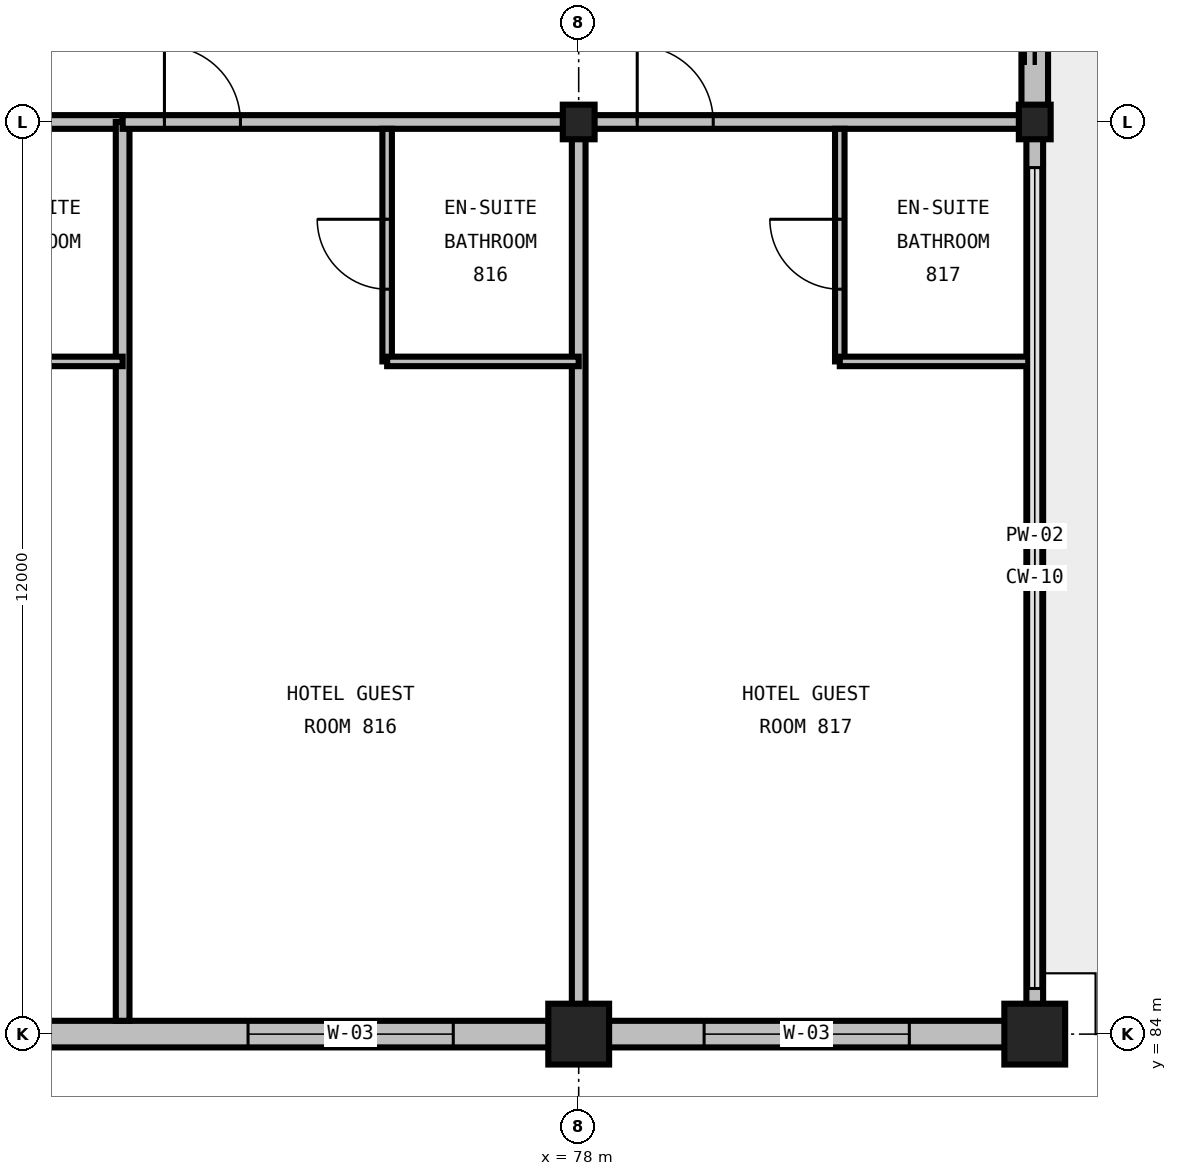
"""IFC4 building model, lengths in metres.
Left out: names, types, materials, properties, quantities, classifications, styles, units other than length and angle.
Written with IfcOpenShell. Run it as: python <this file> out.ifc"""

import sys

from ifc_helpers import new_model, si_unit, direction, frame, frame_2d, origin, origin_2d, place, context, subcontext, project, spatial, rectangle, i_section, extrude, element, fill, save


model = new_model("IFC4")
c1 = context("Model", 3, precision=1e-05, world=origin(), true_north=direction((0.0, 1.0)))
c2 = subcontext(c1, "Body", "Model", "MODEL_VIEW")
j1 = project(units=[si_unit("LENGTHUNIT", "METRE"), si_unit("PLANEANGLEUNIT", "RADIAN")], contexts=[c1])
p1 = place(None, origin())
s1 = spatial("IfcSite", under=j1, at=p1, CompositionType="ELEMENT")
p2 = place(p1, origin())
s2 = spatial("IfcBuilding", under=s1, at=p2, CompositionType="ELEMENT")
p3 = place(p2, frame((0.0, 0.0, 38.4)))
s3 = spatial("IfcBuildingStorey", under=s2, at=p3, CompositionType="ELEMENT", Elevation=38.4)
p4 = place(p3, frame((78.0, 84.0, 0.0), z_axis=(0.0, 0.0, 1.0), x_axis=(1.0, 0.0, 0.0)))
e1 = element("IfcColumn", 1, at=p4, inside=s3, PredefinedType="COLUMN", context=c2, shape_type="SweptSolid", body=[
    extrude(rectangle(XDim=0.8, YDim=0.8, at=origin_2d()), origin(), (0.0, 0.0, 1.0), 3.6),
])
p5 = place(p3, frame((78.0, 96.0, 0.0), z_axis=(0.0, 0.0, 1.0), x_axis=(1.0, 0.0, 0.0)))
e2 = element("IfcColumn", 2, at=p5, inside=s3, PredefinedType="COLUMN", context=c2, shape_type="SweptSolid", body=[
    extrude(i_section(OverallWidth=0.419, OverallDepth=0.455, WebThickness=0.042, FlangeThickness=0.068, FilletRadius=0.031, at=origin_2d()), origin(), (0.0, 0.0, 1.0), 3.6),
])
p6 = place(p3, frame((84.0, 84.0, 0.0), z_axis=(0.0, 0.0, 1.0), x_axis=(1.0, 0.0, 0.0)))
e3 = element("IfcColumn", 3, at=p6, inside=s3, PredefinedType="COLUMN", context=c2, shape_type="SweptSolid", body=[
    extrude(rectangle(XDim=0.8, YDim=0.8, at=origin_2d()), origin(), (0.0, 0.0, 1.0), 3.6),
])
p7 = place(p3, frame((84.0, 96.0, 0.0), z_axis=(0.0, 0.0, 1.0), x_axis=(1.0, 0.0, 0.0)))
e4 = element("IfcColumn", 4, at=p7, inside=s3, PredefinedType="COLUMN", context=c2, shape_type="SweptSolid", body=[
    extrude(i_section(OverallWidth=0.419, OverallDepth=0.455, WebThickness=0.042, FlangeThickness=0.068, FilletRadius=0.031, at=origin_2d()), origin(), (0.0, 0.0, 1.0), 3.6),
])
p8 = place(p3, frame((66.0, 84.0, 0.0), z_axis=(0.0, 0.0, 1.0), x_axis=(1.0, 0.0, 0.0)))
e5 = element("IfcWall", 5, at=p8, inside=s3, PredefinedType="STANDARD", context=c2, shape_type="SweptSolid", body=[
    extrude(rectangle(XDim=12.0, YDim=0.35, at=frame_2d((6.0, 0.0))), origin(), (0.0, 0.0, 1.0), 2.486),
])
p9 = place(p8, frame((1.65, 0.0, 0.72)))
e6 = element("IfcOpeningElement", 6, at=p9, cuts=e5, PredefinedType="OPENING", context=c2, shape_type="SweptSolid", body=[
    extrude(rectangle(XDim=2.7, YDim=1.65, at=frame_2d((1.35, 0.825))), frame((0.0, 0.19, 0.0), z_axis=(0.0, -1.0, 0.0), x_axis=(1.0, 0.0, 0.0)), (0.0, 0.0, 1.0), 0.38),
])
p10 = place(p8, frame((7.65, 0.0, 0.72)))
e7 = element("IfcOpeningElement", 7, at=p10, cuts=e5, PredefinedType="OPENING", context=c2, shape_type="SweptSolid", body=[
    extrude(rectangle(XDim=2.7, YDim=1.65, at=frame_2d((1.35, 0.825))), frame((0.0, 0.19, 0.0), z_axis=(0.0, -1.0, 0.0), x_axis=(1.0, 0.0, 0.0)), (0.0, 0.0, 1.0), 0.38),
])
p11 = place(p3, frame((78.0, 84.0, 0.0), z_axis=(0.0, 0.0, 1.0), x_axis=(1.0, 0.0, 0.0)))
e8 = element("IfcWall", 8, at=p11, inside=s3, PredefinedType="STANDARD", context=c2, shape_type="SweptSolid", body=[
    extrude(rectangle(XDim=6.0, YDim=0.35, at=frame_2d((3.0, 0.0))), origin(), (0.0, 0.0, 1.0), 2.486),
])
p12 = place(p11, frame((1.65, 0.0, 0.72)))
e9 = element("IfcOpeningElement", 9, at=p12, cuts=e8, PredefinedType="OPENING", context=c2, shape_type="SweptSolid", body=[
    extrude(rectangle(XDim=2.7, YDim=1.65, at=frame_2d((1.35, 0.825))), frame((0.0, 0.19, 0.0), z_axis=(0.0, -1.0, 0.0), x_axis=(1.0, 0.0, 0.0)), (0.0, 0.0, 1.0), 0.38),
])
p13 = place(p3, frame((84.0, 84.0, 0.0), z_axis=(0.0, 0.0, 1.0), x_axis=(0.0, 1.0, 0.0)))
e10 = element("IfcWall", 10, at=p13, inside=s3, PredefinedType="PARAPET", context=c2, shape_type="SweptSolid", body=[
    extrude(rectangle(XDim=12.0, YDim=0.22, at=frame_2d((6.0, 0.0))), origin(), (0.0, 0.0, 1.0), 0.2),
])
p14 = place(p3, frame((84.0, 96.0, 0.0), z_axis=(0.0, 0.0, 1.0), x_axis=(0.0, 1.0, 0.0)))
e11 = element("IfcWall", 11, at=p14, inside=s3, PredefinedType="STANDARD", context=c2, shape_type="SweptSolid", body=[
    extrude(rectangle(XDim=9.0, YDim=0.35, at=frame_2d((4.5, 0.0))), origin(), (0.0, 0.0, 1.0), 2.981),
])
p15 = place(p14, frame((0.75, 0.0, 0.0)))
e12 = element("IfcOpeningElement", 12, at=p15, cuts=e11, PredefinedType="OPENING", context=c2, shape_type="SweptSolid", body=[
    extrude(rectangle(XDim=1.6, YDim=2.15, at=frame_2d((0.8, 1.075))), frame((0.0, 0.19, 0.0), z_axis=(0.0, -1.0, 0.0), x_axis=(1.0, 0.0, 0.0)), (0.0, 0.0, 1.0), 0.38),
])
p16 = place(p3, frame((66.0, 96.0, 0.0), z_axis=(0.0, 0.0, 1.0), x_axis=(1.0, 0.0, 0.0)))
e13 = element("IfcWall", 13, at=p16, inside=s3, PredefinedType="PARTITIONING", context=c2, shape_type="SweptSolid", body=[
    extrude(rectangle(XDim=6.0, YDim=0.18, at=frame_2d((3.0, 0.0))), origin(), (0.0, 0.0, 1.0), 2.664),
])
p17 = place(p16, frame((0.77, 0.0, 0.0)))
e14 = element("IfcOpeningElement", 14, at=p17, cuts=e13, PredefinedType="OPENING", context=c2, shape_type="SweptSolid", body=[
    extrude(rectangle(XDim=1.0, YDim=2.15, at=frame_2d((0.5, 1.075))), frame((0.0, 0.105, 0.0), z_axis=(0.0, -1.0, 0.0), x_axis=(1.0, 0.0, 0.0)), (0.0, 0.0, 1.0), 0.21),
])
p18 = place(p3, frame((72.0, 84.175, 0.0), z_axis=(0.0, 0.0, 1.0), x_axis=(0.0, 1.0, 0.0)))
e15 = element("IfcWall", 15, at=p18, inside=s3, PredefinedType="PARTITIONING", context=c2, shape_type="SweptSolid", body=[
    extrude(rectangle(XDim=11.825, YDim=0.18, at=frame_2d((5.913, 0.0))), origin(), (0.0, 0.0, 1.0), 3.29),
])
p19 = place(p3, frame((69.48, 92.85, 0.0), z_axis=(0.0, 0.0, 1.0), x_axis=(1.0, 0.0, 0.0)))
e16 = element("IfcWall", 16, at=p19, inside=s3, PredefinedType="PARTITIONING", context=c2, shape_type="SweptSolid", body=[
    extrude(rectangle(XDim=2.52, YDim=0.125, at=frame_2d((1.26, 0.0))), origin(), (0.0, 0.0, 1.0), 3.29),
])
p20 = place(p3, frame((72.0, 96.0, 0.0), z_axis=(0.0, 0.0, 1.0), x_axis=(1.0, 0.0, 0.0)))
e17 = element("IfcWall", 17, at=p20, inside=s3, PredefinedType="PARTITIONING", context=c2, shape_type="SweptSolid", body=[
    extrude(rectangle(XDim=6.0, YDim=0.18, at=frame_2d((3.0, 0.0))), origin(), (0.0, 0.0, 1.0), 2.664),
])
p21 = place(p20, frame((0.55, 0.0, 0.0)))
e18 = element("IfcOpeningElement", 18, at=p21, cuts=e17, PredefinedType="OPENING", context=c2, shape_type="SweptSolid", body=[
    extrude(rectangle(XDim=1.0, YDim=2.15, at=frame_2d((0.5, 1.075))), frame((0.0, 0.105, 0.0), z_axis=(0.0, -1.0, 0.0), x_axis=(1.0, 0.0, 0.0)), (0.0, 0.0, 1.0), 0.21),
])
p22 = place(p3, frame((78.0, 84.175, 0.0), z_axis=(0.0, 0.0, 1.0), x_axis=(0.0, 1.0, 0.0)))
e19 = element("IfcWall", 19, at=p22, inside=s3, PredefinedType="PARTITIONING", context=c2, shape_type="SweptSolid", body=[
    extrude(rectangle(XDim=11.825, YDim=0.18, at=frame_2d((5.913, 0.0))), origin(), (0.0, 0.0, 1.0), 2.59),
])
p23 = place(p3, frame((75.48, 92.85, 0.0), z_axis=(0.0, 0.0, 1.0), x_axis=(0.0, 1.0, 0.0)))
e20 = element("IfcWall", 20, at=p23, inside=s3, PredefinedType="PARTITIONING", context=c2, shape_type="SweptSolid", body=[
    extrude(rectangle(XDim=3.06, YDim=0.125, at=frame_2d((1.53, 0.0))), origin(), (0.0, 0.0, 1.0), 3.29),
])
p24 = place(p23, frame((0.95, 0.0, 0.0)))
e21 = element("IfcOpeningElement", 21, at=p24, cuts=e20, PredefinedType="OPENING", context=c2, shape_type="SweptSolid", body=[
    extrude(rectangle(XDim=0.92, YDim=2.1, at=frame_2d((0.46, 1.05))), frame((0.0, 0.077, 0.0), z_axis=(0.0, -1.0, 0.0), x_axis=(1.0, 0.0, 0.0)), (0.0, 0.0, 1.0), 0.155),
])
p25 = place(p3, frame((75.48, 92.85, 0.0), z_axis=(0.0, 0.0, 1.0), x_axis=(1.0, 0.0, 0.0)))
e22 = element("IfcWall", 22, at=p25, inside=s3, PredefinedType="PARTITIONING", context=c2, shape_type="SweptSolid", body=[
    extrude(rectangle(XDim=2.52, YDim=0.125, at=frame_2d((1.26, 0.0))), origin(), (0.0, 0.0, 1.0), 3.29),
])
p26 = place(p3, frame((78.0, 96.0, 0.0), z_axis=(0.0, 0.0, 1.0), x_axis=(1.0, 0.0, 0.0)))
e23 = element("IfcWall", 23, at=p26, inside=s3, PredefinedType="PARTITIONING", context=c2, shape_type="SweptSolid", body=[
    extrude(rectangle(XDim=5.915, YDim=0.18, at=frame_2d((2.957, 0.0))), origin(), (0.0, 0.0, 1.0), 2.736),
])
p27 = place(p26, frame((0.77, 0.0, 0.0)))
e24 = element("IfcOpeningElement", 24, at=p27, cuts=e23, PredefinedType="OPENING", context=c2, shape_type="SweptSolid", body=[
    extrude(rectangle(XDim=1.0, YDim=2.15, at=frame_2d((0.5, 1.075))), frame((0.0, 0.105, 0.0), z_axis=(0.0, -1.0, 0.0), x_axis=(1.0, 0.0, 0.0)), (0.0, 0.0, 1.0), 0.21),
])
p28 = place(p3, frame((81.435, 92.85, 0.0), z_axis=(0.0, 0.0, 1.0), x_axis=(0.0, 1.0, 0.0)))
e25 = element("IfcWall", 25, at=p28, inside=s3, PredefinedType="PARTITIONING", context=c2, shape_type="SweptSolid", body=[
    extrude(rectangle(XDim=3.06, YDim=0.125, at=frame_2d((1.53, 0.0))), origin(), (0.0, 0.0, 1.0), 3.29),
])
p29 = place(p28, frame((0.95, 0.0, 0.0)))
e26 = element("IfcOpeningElement", 26, at=p29, cuts=e25, PredefinedType="OPENING", context=c2, shape_type="SweptSolid", body=[
    extrude(rectangle(XDim=0.92, YDim=2.1, at=frame_2d((0.46, 1.05))), frame((0.0, 0.077, 0.0), z_axis=(0.0, -1.0, 0.0), x_axis=(1.0, 0.0, 0.0)), (0.0, 0.0, 1.0), 0.155),
])
p30 = place(p3, frame((81.435, 92.85, 0.0), z_axis=(0.0, 0.0, 1.0), x_axis=(1.0, 0.0, 0.0)))
e27 = element("IfcWall", 27, at=p30, inside=s3, PredefinedType="PARTITIONING", context=c2, shape_type="SweptSolid", body=[
    extrude(rectangle(XDim=2.48, YDim=0.125, at=frame_2d((1.24, 0.0))), origin(), (0.0, 0.0, 1.0), 3.29),
])
p31 = place(p10, origin())
e28 = element("IfcWindow", 28, at=p31, inside=s3, PartitioningType="TRIPLE_PANEL_VERTICAL", PredefinedType="WINDOW", context=c2, shape_type="SweptSolid", body=[
    extrude(rectangle(XDim=2.7, YDim=1.65, at=frame_2d((1.35, 0.825))), frame((0.0, 0.03, 0.0), z_axis=(0.0, -1.0, 0.0), x_axis=(1.0, 0.0, 0.0)), (0.0, 0.0, 1.0), 0.06),
])
fill(e7, e28)
p32 = place(p12, origin())
e29 = element("IfcWindow", 29, at=p32, inside=s3, PartitioningType="TRIPLE_PANEL_VERTICAL", PredefinedType="WINDOW", context=c2, shape_type="SweptSolid", body=[
    extrude(rectangle(XDim=2.7, YDim=1.65, at=frame_2d((1.35, 0.825))), frame((0.0, 0.03, 0.0), z_axis=(0.0, -1.0, 0.0), x_axis=(1.0, 0.0, 0.0)), (0.0, 0.0, 1.0), 0.06),
])
fill(e9, e29)
p33 = place(p15, origin())
e30 = element("IfcDoor", 30, at=p33, inside=s3, OperationType="DOUBLE_DOOR_SLIDING", PredefinedType="DOOR", context=c2, shape_type="SweptSolid", body=[
    extrude(rectangle(XDim=1.6, YDim=2.15, at=frame_2d((0.8, 1.075))), frame((0.0, 0.025, 0.0), z_axis=(0.0, -1.0, 0.0), x_axis=(1.0, 0.0, 0.0)), (0.0, 0.0, 1.0), 0.05),
])
fill(e12, e30)
p34 = place(p21, origin())
e31 = element("IfcDoor", 31, at=p34, inside=s3, OperationType="SINGLE_SWING_LEFT", PredefinedType="DOOR", context=c2, shape_type="SweptSolid", body=[
    extrude(rectangle(XDim=1.0, YDim=2.15, at=frame_2d((0.5, 1.075))), frame((0.0, 0.025, 0.0), z_axis=(0.0, -1.0, 0.0), x_axis=(1.0, 0.0, 0.0)), (0.0, 0.0, 1.0), 0.05),
])
fill(e18, e31)
p35 = place(p24, origin())
e32 = element("IfcDoor", 32, at=p35, inside=s3, OperationType="SINGLE_SWING_RIGHT", PredefinedType="DOOR", context=c2, shape_type="SweptSolid", body=[
    extrude(rectangle(XDim=0.92, YDim=2.1, at=frame_2d((0.46, 1.05))), frame((0.0, 0.025, 0.0), z_axis=(0.0, -1.0, 0.0), x_axis=(1.0, 0.0, 0.0)), (0.0, 0.0, 1.0), 0.05),
])
fill(e21, e32)
p36 = place(p27, origin())
e33 = element("IfcDoor", 33, at=p36, inside=s3, OperationType="SINGLE_SWING_LEFT", PredefinedType="DOOR", context=c2, shape_type="SweptSolid", body=[
    extrude(rectangle(XDim=1.0, YDim=2.15, at=frame_2d((0.5, 1.075))), frame((0.0, 0.025, 0.0), z_axis=(0.0, -1.0, 0.0), x_axis=(1.0, 0.0, 0.0)), (0.0, 0.0, 1.0), 0.05),
])
fill(e24, e33)
p37 = place(p29, origin())
e34 = element("IfcDoor", 34, at=p37, inside=s3, OperationType="SINGLE_SWING_RIGHT", PredefinedType="DOOR", context=c2, shape_type="SweptSolid", body=[
    extrude(rectangle(XDim=0.92, YDim=2.1, at=frame_2d((0.46, 1.05))), frame((0.0, 0.025, 0.0), z_axis=(0.0, -1.0, 0.0), x_axis=(1.0, 0.0, 0.0)), (0.0, 0.0, 1.0), 0.05),
])
fill(e26, e34)
save(model, sys.argv[1])
